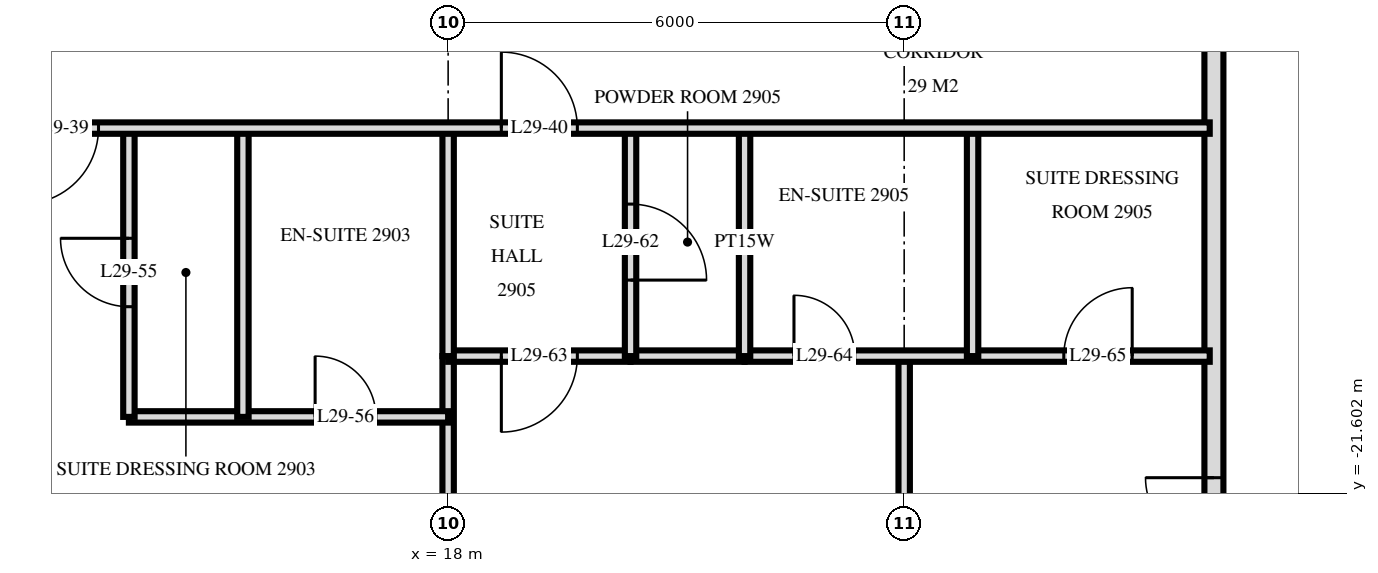
"""IFC4 building model, lengths in metres.
Left out: names, types, materials, properties, quantities, classifications, styles, units other than length and angle.
Written with IfcOpenShell. Run it as: python <this file> out.ifc"""

import sys

from ifc_helpers import new_model, si_unit, direction, frame, frame_2d, origin, place, context, subcontext, project, spatial, rectangle, extrude, element, fill, save


model = new_model("IFC4")
c1 = context("Model", 3, precision=1e-05, world=origin(), true_north=direction((0.0, 1.0)))
c2 = subcontext(c1, "Body", "Model", "MODEL_VIEW")
j1 = project(units=[si_unit("LENGTHUNIT", "METRE"), si_unit("PLANEANGLEUNIT", "RADIAN")], contexts=[c1])
p1 = place(None, origin())
s1 = spatial("IfcSite", under=j1, at=p1, CompositionType="ELEMENT")
p2 = place(p1, origin())
s2 = spatial("IfcBuilding", under=s1, at=p2, CompositionType="ELEMENT")
p3 = place(p2, frame((0.0, 0.0, 116.4)))
s3 = spatial("IfcBuildingStorey", under=s2, at=p3, CompositionType="ELEMENT", Elevation=116.4)
p4 = place(p3, frame((28.075, -29.275, 0.0), z_axis=(0.0, 0.0, 1.0), x_axis=(0.0, 1.0, 0.0)))
e1 = element("IfcWall", 1, at=p4, inside=s3, PredefinedType="SOLIDWALL", context=c2, shape_type="SweptSolid", body=[
    extrude(rectangle(XDim=25.951, YDim=0.25, at=frame_2d((12.975, 0.0))), origin(), (0.0, 0.0, 1.0), 3.32),
])
p5 = place(p4, frame((0.575, 0.0, 0.0)))
e2 = element("IfcOpeningElement", 2, at=p5, cuts=e1, PredefinedType="OPENING", context=c2, shape_type="SweptSolid", body=[
    extrude(rectangle(XDim=1.8, YDim=2.4, at=frame_2d((0.9, 1.2))), frame((0.0, 0.135, 0.0), z_axis=(0.0, -1.0, 0.0), x_axis=(1.0, 0.0, 0.0)), (0.0, 0.0, 1.0), 0.27),
])
p6 = place(p4, frame((3.325, 0.0, 0.3)))
e3 = element("IfcOpeningElement", 3, at=p6, cuts=e1, PredefinedType="OPENING", context=c2, shape_type="SweptSolid", body=[
    extrude(rectangle(XDim=1.8, YDim=2.1, at=frame_2d((0.9, 1.05))), frame((0.0, 0.135, 0.0), z_axis=(0.0, -1.0, 0.0), x_axis=(1.0, 0.0, 0.0)), (0.0, 0.0, 1.0), 0.27),
])
p7 = place(p4, frame((6.075, 0.0, 0.0)))
e4 = element("IfcOpeningElement", 4, at=p7, cuts=e1, PredefinedType="OPENING", context=c2, shape_type="SweptSolid", body=[
    extrude(rectangle(XDim=1.8, YDim=2.4, at=frame_2d((0.9, 1.2))), frame((0.0, 0.135, 0.0), z_axis=(0.0, -1.0, 0.0), x_axis=(1.0, 0.0, 0.0)), (0.0, 0.0, 1.0), 0.27),
])
p8 = place(p4, frame((17.125, 0.0, 0.0)))
e5 = element("IfcOpeningElement", 5, at=p8, cuts=e1, PredefinedType="OPENING", context=c2, shape_type="SweptSolid", body=[
    extrude(rectangle(XDim=1.8, YDim=2.4, at=frame_2d((0.9, 1.2))), frame((0.0, 0.135, 0.0), z_axis=(0.0, -1.0, 0.0), x_axis=(1.0, 0.0, 0.0)), (0.0, 0.0, 1.0), 0.27),
])
p9 = place(p3, frame((24.9, -19.8, 0.0), z_axis=(0.0, 0.0, 1.0), x_axis=(0.0, 1.0, 0.0)))
e6 = element("IfcWall", 6, at=p9, inside=s3, PredefinedType="PARTITIONING", context=c2, shape_type="SweptSolid", body=[
    extrude(rectangle(XDim=3.0, YDim=0.15, at=frame_2d((1.5, 0.0))), origin(), (0.0, 0.0, 1.0), 3.32),
])
p10 = place(p3, frame((24.0, -33.557, 0.0), z_axis=(0.0, 0.0, 1.0), x_axis=(0.0, 1.0, 0.0)))
e7 = element("IfcWall", 7, at=p10, inside=s3, PredefinedType="PARTITIONING", context=c2, shape_type="SweptSolid", body=[
    extrude(rectangle(XDim=13.757, YDim=0.15, at=frame_2d((6.878, 0.0))), origin(), (0.0, 0.0, 1.0), 3.32),
])
p11 = place(p10, frame((6.337, 0.0, 0.0)))
e8 = element("IfcOpeningElement", 8, at=p11, cuts=e7, PredefinedType="OPENING", context=c2, shape_type="SweptSolid", body=[
    extrude(rectangle(XDim=0.9, YDim=2.1, at=frame_2d((0.45, 1.05))), frame((0.0, 0.085, 0.0), z_axis=(0.0, -1.0, 0.0), x_axis=(1.0, 0.0, 0.0)), (0.0, 0.0, 1.0), 0.17),
])
p12 = place(p3, frame((21.9, -19.8, 0.0), z_axis=(0.0, 0.0, 1.0), x_axis=(0.0, 1.0, 0.0)))
e9 = element("IfcWall", 9, at=p12, inside=s3, PredefinedType="PLUMBINGWALL", context=c2, shape_type="SweptSolid", body=[
    extrude(rectangle(XDim=3.0, YDim=0.15, at=frame_2d((1.5, 0.0))), origin(), (0.0, 0.0, 1.0), 3.32),
])
p13 = place(p3, frame((20.4, -19.8, 0.0), z_axis=(0.0, 0.0, 1.0), x_axis=(0.0, 1.0, 0.0)))
e10 = element("IfcWall", 10, at=p13, inside=s3, PredefinedType="PARTITIONING", context=c2, shape_type="SweptSolid", body=[
    extrude(rectangle(XDim=3.0, YDim=0.15, at=frame_2d((1.5, 0.0))), origin(), (0.0, 0.0, 1.0), 3.32),
])
p14 = place(p13, frame((1.0, 0.0, 0.0)))
e11 = element("IfcOpeningElement", 11, at=p14, cuts=e10, PredefinedType="OPENING", context=c2, shape_type="SweptSolid", body=[
    extrude(rectangle(XDim=1.0, YDim=2.1, at=frame_2d((0.5, 1.05))), frame((0.0, 0.085, 0.0), z_axis=(0.0, -1.0, 0.0), x_axis=(1.0, 0.0, 0.0)), (0.0, 0.0, 1.0), 0.17),
])
p15 = place(p3, frame((18.0, -19.8, 0.0), z_axis=(0.0, 0.0, 1.0), x_axis=(0.0, 1.0, 0.0)))
e12 = element("IfcWall", 12, at=p15, inside=s3, PredefinedType="PARTITIONING", context=c2, shape_type="SweptSolid", body=[
    extrude(rectangle(XDim=3.0, YDim=0.15, at=frame_2d((1.5, 0.0))), origin(), (0.0, 0.0, 1.0), 3.32),
])
p16 = place(p3, frame((18.0, -33.62, 0.0), z_axis=(0.0, 0.0, 1.0), x_axis=(0.0, 1.0, 0.0)))
e13 = element("IfcWall", 13, at=p16, inside=s3, PredefinedType="PARTITIONING", context=c2, shape_type="SweptSolid", body=[
    extrude(rectangle(XDim=13.82, YDim=0.15, at=frame_2d((6.91, 0.0))), origin(), (0.0, 0.0, 1.0), 3.32),
])
p17 = place(p3, frame((15.3, -20.6, 0.0), z_axis=(0.0, 0.0, 1.0), x_axis=(0.0, 1.0, 0.0)))
e14 = element("IfcWall", 14, at=p17, inside=s3, PredefinedType="PARTITIONING", context=c2, shape_type="SweptSolid", body=[
    extrude(rectangle(XDim=3.8, YDim=0.15, at=frame_2d((1.9, 0.0))), origin(), (0.0, 0.0, 1.0), 3.32),
])
p18 = place(p3, frame((13.8, -20.6, 0.0), z_axis=(0.0, 0.0, 1.0), x_axis=(0.0, 1.0, 0.0)))
e15 = element("IfcWall", 15, at=p18, inside=s3, PredefinedType="PARTITIONING", context=c2, shape_type="SweptSolid", body=[
    extrude(rectangle(XDim=3.8, YDim=0.15, at=frame_2d((1.9, 0.0))), origin(), (0.0, 0.0, 1.0), 3.32),
])
p19 = place(p18, frame((1.45, 0.0, 0.0)))
e16 = element("IfcOpeningElement", 16, at=p19, cuts=e15, PredefinedType="OPENING", context=c2, shape_type="SweptSolid", body=[
    extrude(rectangle(XDim=0.9, YDim=2.1, at=frame_2d((0.45, 1.05))), frame((0.0, 0.085, 0.0), z_axis=(0.0, -1.0, 0.0), x_axis=(1.0, 0.0, 0.0)), (0.0, 0.0, 1.0), 0.17),
])
p20 = place(p3, frame((13.8, -20.6, 0.0), z_axis=(0.0, 0.0, 1.0), x_axis=(1.0, 0.0, 0.0)))
e17 = element("IfcWall", 17, at=p20, inside=s3, PredefinedType="PARTITIONING", context=c2, shape_type="SweptSolid", body=[
    extrude(rectangle(XDim=4.2, YDim=0.15, at=frame_2d((2.1, 0.0))), origin(), (0.0, 0.0, 1.0), 3.32),
])
p21 = place(p20, frame((2.45, 0.0, 0.0)))
e18 = element("IfcOpeningElement", 18, at=p21, cuts=e17, PredefinedType="OPENING", context=c2, shape_type="SweptSolid", body=[
    extrude(rectangle(XDim=0.8, YDim=2.1, at=frame_2d((0.4, 1.05))), frame((0.0, 0.085, 0.0), z_axis=(0.0, -1.0, 0.0), x_axis=(1.0, 0.0, 0.0)), (0.0, 0.0, 1.0), 0.17),
])
p22 = place(p3, frame((18.0, -19.8, 0.0), z_axis=(0.0, 0.0, 1.0), x_axis=(1.0, 0.0, 0.0)))
e19 = element("IfcWall", 19, at=p22, inside=s3, PredefinedType="PARTITIONING", context=c2, shape_type="SweptSolid", body=[
    extrude(rectangle(XDim=2.4, YDim=0.15, at=frame_2d((1.2, 0.0))), origin(), (0.0, 0.0, 1.0), 3.32),
])
p23 = place(p22, frame((0.7, 0.0, 0.0)))
e20 = element("IfcOpeningElement", 20, at=p23, cuts=e19, PredefinedType="OPENING", context=c2, shape_type="SweptSolid", body=[
    extrude(rectangle(XDim=1.0, YDim=2.1, at=frame_2d((0.5, 1.05))), frame((0.0, 0.085, 0.0), z_axis=(0.0, -1.0, 0.0), x_axis=(1.0, 0.0, 0.0)), (0.0, 0.0, 1.0), 0.17),
])
p24 = place(p3, frame((21.9, -19.8, 0.0), z_axis=(0.0, 0.0, 1.0), x_axis=(1.0, 0.0, 0.0)))
e21 = element("IfcWall", 21, at=p24, inside=s3, PredefinedType="PARTITIONING", context=c2, shape_type="SweptSolid", body=[
    extrude(rectangle(XDim=6.12, YDim=0.15, at=frame_2d((3.06, 0.0))), origin(), (0.0, 0.0, 1.0), 3.32),
])
p25 = place(p24, frame((0.65, 0.0, 0.0)))
e22 = element("IfcOpeningElement", 22, at=p25, cuts=e21, PredefinedType="OPENING", context=c2, shape_type="SweptSolid", body=[
    extrude(rectangle(XDim=0.8, YDim=2.1, at=frame_2d((0.4, 1.05))), frame((0.0, 0.085, 0.0), z_axis=(0.0, -1.0, 0.0), x_axis=(1.0, 0.0, 0.0)), (0.0, 0.0, 1.0), 0.17),
])
p26 = place(p24, frame((4.2, 0.0, 0.0)))
e23 = element("IfcOpeningElement", 23, at=p26, cuts=e21, PredefinedType="OPENING", context=c2, shape_type="SweptSolid", body=[
    extrude(rectangle(XDim=0.9, YDim=2.1, at=frame_2d((0.45, 1.05))), frame((0.0, 0.085, 0.0), z_axis=(0.0, -1.0, 0.0), x_axis=(1.0, 0.0, 0.0)), (0.0, 0.0, 1.0), 0.17),
])
p27 = place(p3, frame((20.4, -19.8, 0.0), z_axis=(0.0, 0.0, 1.0), x_axis=(1.0, 0.0, 0.0)))
e24 = element("IfcWall", 24, at=p27, inside=s3, PredefinedType="PLUMBINGWALL", context=c2, shape_type="SweptSolid", body=[
    extrude(rectangle(XDim=1.5, YDim=0.15, at=frame_2d((0.75, 0.0))), origin(), (0.0, 0.0, 1.0), 3.32),
])
p28 = place(p3, frame((-28.02, -16.8, 0.0), z_axis=(0.0, 0.0, 1.0), x_axis=(1.0, 0.0, 0.0)))
e25 = element("IfcWall", 25, at=p28, inside=s3, PredefinedType="PARTITIONING", context=c2, shape_type="SweptSolid", body=[
    extrude(rectangle(XDim=56.04, YDim=0.15, at=frame_2d((28.02, 0.0))), origin(), (0.0, 0.0, 1.0), 3.32),
])
p29 = place(p28, frame((13.17, 0.0, 0.0)))
e26 = element("IfcOpeningElement", 26, at=p29, cuts=e25, PredefinedType="OPENING", context=c2, shape_type="SweptSolid", body=[
    extrude(rectangle(XDim=1.0, YDim=2.1, at=frame_2d((0.5, 1.05))), frame((0.0, 0.085, 0.0), z_axis=(0.0, -1.0, 0.0), x_axis=(1.0, 0.0, 0.0)), (0.0, 0.0, 1.0), 0.17),
])
p30 = place(p28, frame((11.87, 0.0, 0.0)))
e27 = element("IfcOpeningElement", 27, at=p30, cuts=e25, PredefinedType="OPENING", context=c2, shape_type="SweptSolid", body=[
    extrude(rectangle(XDim=1.0, YDim=2.1, at=frame_2d((0.5, 1.05))), frame((0.0, 0.085, 0.0), z_axis=(0.0, -1.0, 0.0), x_axis=(1.0, 0.0, 0.0)), (0.0, 0.0, 1.0), 0.17),
])
p31 = place(p28, frame((8.32, 0.0, 0.0)))
e28 = element("IfcOpeningElement", 28, at=p31, cuts=e25, PredefinedType="OPENING", context=c2, shape_type="SweptSolid", body=[
    extrude(rectangle(XDim=1.0, YDim=2.1, at=frame_2d((0.5, 1.05))), frame((0.0, 0.085, 0.0), z_axis=(0.0, -1.0, 0.0), x_axis=(1.0, 0.0, 0.0)), (0.0, 0.0, 1.0), 0.17),
])
p32 = place(p28, frame((40.42, 0.0, 0.0)))
e29 = element("IfcOpeningElement", 29, at=p32, cuts=e25, PredefinedType="OPENING", context=c2, shape_type="SweptSolid", body=[
    extrude(rectangle(XDim=1.0, YDim=2.1, at=frame_2d((0.5, 1.05))), frame((0.0, 0.085, 0.0), z_axis=(0.0, -1.0, 0.0), x_axis=(1.0, 0.0, 0.0)), (0.0, 0.0, 1.0), 0.17),
])
p33 = place(p28, frame((46.72, 0.0, 0.0)))
e30 = element("IfcOpeningElement", 30, at=p33, cuts=e25, PredefinedType="OPENING", context=c2, shape_type="SweptSolid", body=[
    extrude(rectangle(XDim=1.0, YDim=2.1, at=frame_2d((0.5, 1.05))), frame((0.0, 0.085, 0.0), z_axis=(0.0, -1.0, 0.0), x_axis=(1.0, 0.0, 0.0)), (0.0, 0.0, 1.0), 0.17),
])
p34 = place(p28, frame((21.52, 0.0, 0.0)))
e31 = element("IfcOpeningElement", 31, at=p34, cuts=e25, PredefinedType="OPENING", context=c2, shape_type="SweptSolid", body=[
    extrude(rectangle(XDim=1.0, YDim=2.1, at=frame_2d((0.5, 1.05))), frame((0.0, 0.085, 0.0), z_axis=(0.0, -1.0, 0.0), x_axis=(1.0, 0.0, 0.0)), (0.0, 0.0, 1.0), 0.17),
])
p35 = place(p28, frame((30.52, 0.0, 0.0)))
e32 = element("IfcOpeningElement", 32, at=p35, cuts=e25, PredefinedType="OPENING", context=c2, shape_type="SweptSolid", body=[
    extrude(rectangle(XDim=1.0, YDim=2.1, at=frame_2d((0.5, 1.05))), frame((0.0, 0.085, 0.0), z_axis=(0.0, -1.0, 0.0), x_axis=(1.0, 0.0, 0.0)), (0.0, 0.0, 1.0), 0.17),
])
p36 = place(p28, frame((36.52, 0.0, 0.0)))
e33 = element("IfcOpeningElement", 33, at=p36, cuts=e25, PredefinedType="OPENING", context=c2, shape_type="SweptSolid", body=[
    extrude(rectangle(XDim=1.0, YDim=2.1, at=frame_2d((0.5, 1.05))), frame((0.0, 0.085, 0.0), z_axis=(0.0, -1.0, 0.0), x_axis=(1.0, 0.0, 0.0)), (0.0, 0.0, 1.0), 0.17),
])
p37 = place(p7, origin())
e34 = element("IfcDoor", 34, at=p37, inside=s3, OperationType="DOUBLE_DOOR_SINGLE_SWING", PredefinedType="DOOR", context=c2, shape_type="SweptSolid", body=[
    extrude(rectangle(XDim=1.8, YDim=2.4, at=frame_2d((0.9, 1.2))), frame((0.0, 0.025, 0.0), z_axis=(0.0, -1.0, 0.0), x_axis=(1.0, 0.0, 0.0)), (0.0, 0.0, 1.0), 0.05),
])
fill(e4, e34)
p38 = place(p32, frame((0.5, 0.0, 0.0), z_axis=(0.0, 0.0, 1.0), x_axis=(-1.0, 0.0, 0.0)))
e35 = element("IfcDoor", 35, at=p38, inside=s3, OperationType="SINGLE_SWING_LEFT", PredefinedType="DOOR", context=c2, shape_type="SweptSolid", body=[
    extrude(rectangle(XDim=1.0, YDim=2.1, at=frame_2d((0.0, 1.05))), frame((0.0, -0.025, 0.0), z_axis=(0.0, 1.0, 0.0), x_axis=(-1.0, 0.0, 0.0)), (0.0, 0.0, 1.0), 0.05),
])
fill(e29, e35)
p39 = place(p33, origin())
e36 = element("IfcDoor", 36, at=p39, inside=s3, OperationType="SINGLE_SWING_RIGHT", PredefinedType="DOOR", context=c2, shape_type="SweptSolid", body=[
    extrude(rectangle(XDim=1.0, YDim=2.1, at=frame_2d((0.5, 1.05))), frame((0.0, 0.025, 0.0), z_axis=(0.0, -1.0, 0.0), x_axis=(1.0, 0.0, 0.0)), (0.0, 0.0, 1.0), 0.05),
])
fill(e30, e36)
p40 = place(p19, origin())
e37 = element("IfcDoor", 37, at=p40, inside=s3, OperationType="SINGLE_SWING_LEFT", PredefinedType="DOOR", context=c2, shape_type="SweptSolid", body=[
    extrude(rectangle(XDim=0.9, YDim=2.1, at=frame_2d((0.45, 1.05))), frame((0.0, 0.025, 0.0), z_axis=(0.0, -1.0, 0.0), x_axis=(1.0, 0.0, 0.0)), (0.0, 0.0, 1.0), 0.05),
])
fill(e16, e37)
p41 = place(p21, origin())
e38 = element("IfcDoor", 38, at=p41, inside=s3, OperationType="SINGLE_SWING_RIGHT", PredefinedType="DOOR", context=c2, shape_type="SweptSolid", body=[
    extrude(rectangle(XDim=0.8, YDim=2.1, at=frame_2d((0.4, 1.05))), frame((0.0, 0.025, 0.0), z_axis=(0.0, -1.0, 0.0), x_axis=(1.0, 0.0, 0.0)), (0.0, 0.0, 1.0), 0.05),
])
fill(e18, e38)
p42 = place(p14, frame((0.5, 0.0, 0.0), z_axis=(0.0, 0.0, 1.0), x_axis=(-1.0, 0.0, 0.0)))
e39 = element("IfcDoor", 39, at=p42, inside=s3, OperationType="SINGLE_SWING_LEFT", PredefinedType="DOOR", context=c2, shape_type="SweptSolid", body=[
    extrude(rectangle(XDim=1.0, YDim=2.1, at=frame_2d((0.0, 1.05))), frame((0.0, -0.025, 0.0), z_axis=(0.0, 1.0, 0.0), x_axis=(-1.0, 0.0, 0.0)), (0.0, 0.0, 1.0), 0.05),
])
fill(e11, e39)
p43 = place(p23, frame((0.5, 0.0, 0.0), z_axis=(0.0, 0.0, 1.0), x_axis=(-1.0, 0.0, 0.0)))
e40 = element("IfcDoor", 40, at=p43, inside=s3, OperationType="SINGLE_SWING_LEFT", PredefinedType="DOOR", context=c2, shape_type="SweptSolid", body=[
    extrude(rectangle(XDim=1.0, YDim=2.1, at=frame_2d((0.0, 1.05))), frame((0.0, -0.025, 0.0), z_axis=(0.0, 1.0, 0.0), x_axis=(-1.0, 0.0, 0.0)), (0.0, 0.0, 1.0), 0.05),
])
fill(e20, e40)
p44 = place(p25, origin())
e41 = element("IfcDoor", 41, at=p44, inside=s3, OperationType="SINGLE_SWING_RIGHT", PredefinedType="DOOR", context=c2, shape_type="SweptSolid", body=[
    extrude(rectangle(XDim=0.8, YDim=2.1, at=frame_2d((0.4, 1.05))), frame((0.0, 0.025, 0.0), z_axis=(0.0, -1.0, 0.0), x_axis=(1.0, 0.0, 0.0)), (0.0, 0.0, 1.0), 0.05),
])
fill(e22, e41)
p45 = place(p26, origin())
e42 = element("IfcDoor", 42, at=p45, inside=s3, OperationType="SINGLE_SWING_LEFT", PredefinedType="DOOR", context=c2, shape_type="SweptSolid", body=[
    extrude(rectangle(XDim=0.9, YDim=2.1, at=frame_2d((0.45, 1.05))), frame((0.0, 0.025, 0.0), z_axis=(0.0, -1.0, 0.0), x_axis=(1.0, 0.0, 0.0)), (0.0, 0.0, 1.0), 0.05),
])
fill(e23, e42)
save(model, sys.argv[1])
